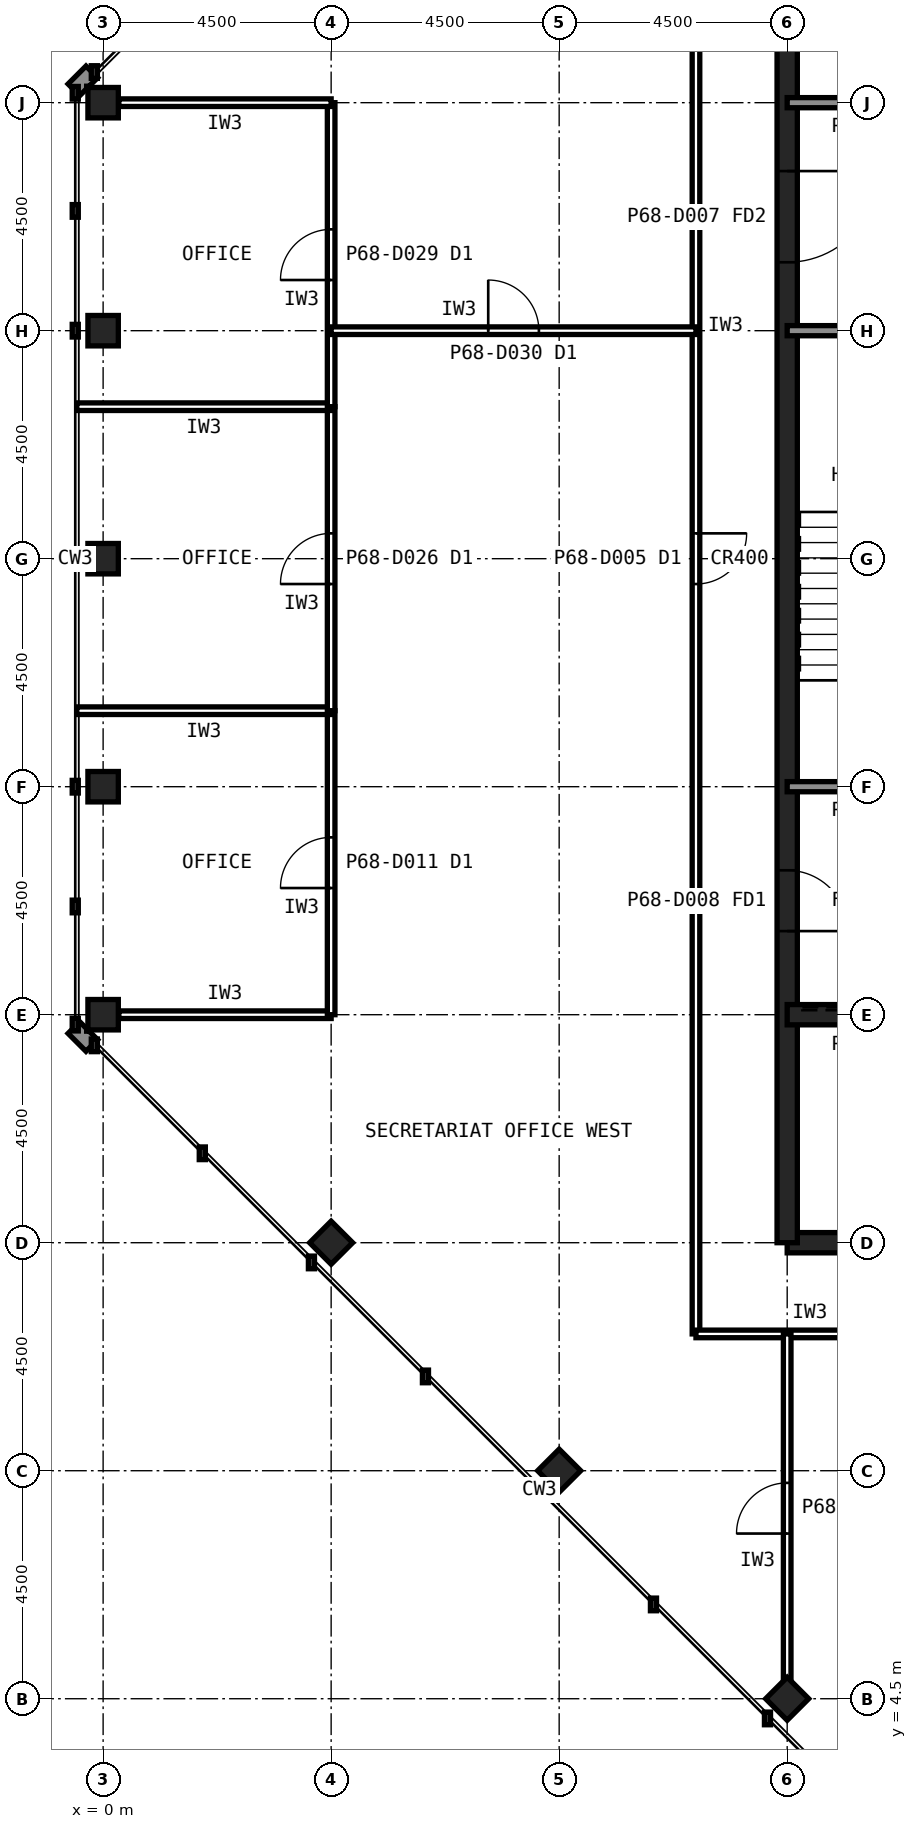
"""IFC4 building model, lengths in metres.
Left out: names, types, materials, properties, quantities, classifications, styles, units other than length and angle.
Written with IfcOpenShell. Run it as: python <this file> out.ifc"""

import sys

from ifc_helpers import new_model, si_unit, direction, frame, frame_2d, origin, origin_2d, place, context, subcontext, project, spatial, rectangle, hollow_rectangle, extrude, element, fill, save


model = new_model("IFC4")
c1 = context("Model", 3, precision=1e-05, world=origin(), true_north=direction((0.0, 1.0)))
c2 = subcontext(c1, "Body", "Model", "MODEL_VIEW")
j1 = project(units=[si_unit("LENGTHUNIT", "METRE"), si_unit("PLANEANGLEUNIT", "RADIAN")], contexts=[c1])
p1 = place(None, origin())
s1 = spatial("IfcSite", under=j1, at=p1, CompositionType="ELEMENT")
p2 = place(p1, origin())
s2 = spatial("IfcBuilding", under=s1, at=p2, CompositionType="ELEMENT")
p3 = place(p2, frame((0.0, 0.0, 286.6)))
s3 = spatial("IfcBuildingStorey", under=s2, at=p3, CompositionType="ELEMENT", Elevation=286.6)
for number, where, z_axis, x_axis in (
    (1, (0.0, 36.0, 0.0), (0.0, 0.0, 1.0), (1.0, 0.0, 0.0)),
    (2, (0.0, 31.5, 0.0), (0.0, 0.0, 1.0), (1.0, 0.0, 0.0)),
    (3, (0.0, 27.0, 0.0), (0.0, 0.0, 1.0), (1.0, 0.0, 0.0)),
    (4, (0.0, 22.5, 0.0), (0.0, 0.0, 1.0), (1.0, 0.0, 0.0)),
    (5, (0.0, 18.0, 0.0), (0.0, 0.0, 1.0), (1.0, 0.0, 0.0)),
    (6, (13.5, 4.5, 0.0), (0.0, 0.0, 1.0), (0.707, 0.707, 0.0)),
    (7, (9.0, 9.0, 0.0), (0.0, 0.0, 1.0), (0.707, 0.707, 0.0)),
    (8, (4.5, 13.5, 0.0), (0.0, 0.0, 1.0), (0.707, 0.707, 0.0)),
):
    element("IfcColumn", number, at=place(p3, frame(where, z_axis=z_axis, x_axis=x_axis)), inside=s3, PredefinedType="COLUMN", context=c2, shape_type="SweptSolid", body=[
        extrude(hollow_rectangle(XDim=0.6, YDim=0.6, WallThickness=0.028, at=origin_2d()), origin(), (0.0, 0.0, 1.0), 4.0),
    ])
p4 = place(p3, frame((13.5, 13.5, 0.0), z_axis=(0.0, 0.0, 1.0), x_axis=(1.0, 0.0, 0.0)))
e9 = element("IfcWall", 9, at=p4, inside=s3, PredefinedType="SHEAR", context=c2, shape_type="SweptSolid", body=[
    extrude(rectangle(XDim=27.0, YDim=0.4, at=frame_2d((13.5, 0.0))), origin(), (0.0, 0.0, 1.0), 4.0),
])
p5 = place(p3, frame((13.5, 40.5, 0.0), z_axis=(0.0, 0.0, 1.0), x_axis=(0.0, -1.0, 0.0)))
e10 = element("IfcWall", 10, at=p5, inside=s3, PredefinedType="SHEAR", context=c2, shape_type="SweptSolid", body=[
    extrude(rectangle(XDim=27.0, YDim=0.4, at=frame_2d((13.5, 0.0))), origin(), (0.0, 0.0, 1.0), 4.0),
])
p6 = place(p5, frame((19.65, 0.0, 0.0)))
e11 = element("IfcOpeningElement", 11, at=p6, cuts=e10, PredefinedType="OPENING", context=c2, shape_type="SweptSolid", body=[
    extrude(rectangle(XDim=1.2, YDim=2.1, at=frame_2d((0.6, 1.05))), frame((0.0, 0.21, 0.0), z_axis=(0.0, -1.0, 0.0), x_axis=(1.0, 0.0, 0.0)), (0.0, 0.0, 1.0), 0.42),
])
p7 = place(p5, frame((5.85, 0.0, 0.0)))
e12 = element("IfcOpeningElement", 12, at=p7, cuts=e10, PredefinedType="OPENING", context=c2, shape_type="SweptSolid", body=[
    extrude(rectangle(XDim=1.8, YDim=2.1, at=frame_2d((0.9, 1.05))), frame((0.0, 0.21, 0.0), z_axis=(0.0, -1.0, 0.0), x_axis=(1.0, 0.0, 0.0)), (0.0, 0.0, 1.0), 0.42),
])
p8 = place(p3, frame((13.5, 18.0, 0.0), z_axis=(0.0, 0.0, 1.0), x_axis=(1.0, 0.0, 0.0)))
e13 = element("IfcWall", 13, at=p8, inside=s3, PredefinedType="SHEAR", context=c2, shape_type="SweptSolid", body=[
    extrude(rectangle(XDim=27.0, YDim=0.4, at=frame_2d((13.5, 0.0))), origin(), (0.0, 0.0, 1.0), 4.0),
])
p9 = place(p8, frame((24.3, 0.0, 0.0)))
e14 = element("IfcOpeningElement", 14, at=p9, cuts=e13, PredefinedType="OPENING", context=c2, shape_type="SweptSolid", body=[
    extrude(rectangle(XDim=0.9, YDim=2.1, at=frame_2d((0.45, 1.05))), frame((0.0, 0.21, 0.0), z_axis=(0.0, -1.0, 0.0), x_axis=(1.0, 0.0, 0.0)), (0.0, 0.0, 1.0), 0.42),
])
p10 = place(p8, frame((5.45, 0.0, 0.0)))
e15 = element("IfcOpeningElement", 15, at=p10, cuts=e13, PredefinedType="OPENING", context=c2, shape_type="SweptSolid", body=[
    extrude(rectangle(XDim=1.1, YDim=2.1, at=frame_2d((0.55, 1.05))), frame((0.0, 0.21, 0.0), z_axis=(0.0, -1.0, 0.0), x_axis=(1.0, 0.0, 0.0)), (0.0, 0.0, 1.0), 0.42),
])
p11 = place(p8, frame((8.45, 0.0, 0.0)))
e16 = element("IfcOpeningElement", 16, at=p11, cuts=e13, PredefinedType="OPENING", context=c2, shape_type="SweptSolid", body=[
    extrude(rectangle(XDim=1.1, YDim=2.1, at=frame_2d((0.55, 1.05))), frame((0.0, 0.21, 0.0), z_axis=(0.0, -1.0, 0.0), x_axis=(1.0, 0.0, 0.0)), (0.0, 0.0, 1.0), 0.42),
])
p12 = place(p8, frame((11.45, 0.0, 0.0)))
e17 = element("IfcOpeningElement", 17, at=p12, cuts=e13, PredefinedType="OPENING", context=c2, shape_type="SweptSolid", body=[
    extrude(rectangle(XDim=1.1, YDim=2.1, at=frame_2d((0.55, 1.05))), frame((0.0, 0.21, 0.0), z_axis=(0.0, -1.0, 0.0), x_axis=(1.0, 0.0, 0.0)), (0.0, 0.0, 1.0), 0.42),
])
p13 = place(p8, frame((14.45, 0.0, 0.0)))
e18 = element("IfcOpeningElement", 18, at=p13, cuts=e13, PredefinedType="OPENING", context=c2, shape_type="SweptSolid", body=[
    extrude(rectangle(XDim=1.1, YDim=2.1, at=frame_2d((0.55, 1.05))), frame((0.0, 0.21, 0.0), z_axis=(0.0, -1.0, 0.0), x_axis=(1.0, 0.0, 0.0)), (0.0, 0.0, 1.0), 0.42),
])
p14 = place(p8, frame((17.45, 0.0, 0.0)))
e19 = element("IfcOpeningElement", 19, at=p14, cuts=e13, PredefinedType="OPENING", context=c2, shape_type="SweptSolid", body=[
    extrude(rectangle(XDim=1.1, YDim=2.1, at=frame_2d((0.55, 1.05))), frame((0.0, 0.21, 0.0), z_axis=(0.0, -1.0, 0.0), x_axis=(1.0, 0.0, 0.0)), (0.0, 0.0, 1.0), 0.42),
])
p15 = place(p8, frame((20.45, 0.0, 0.0)))
e20 = element("IfcOpeningElement", 20, at=p15, cuts=e13, PredefinedType="OPENING", context=c2, shape_type="SweptSolid", body=[
    extrude(rectangle(XDim=1.1, YDim=2.1, at=frame_2d((0.55, 1.05))), frame((0.0, 0.21, 0.0), z_axis=(0.0, -1.0, 0.0), x_axis=(1.0, 0.0, 0.0)), (0.0, 0.0, 1.0), 0.42),
])
p16 = place(p8, frame((1.6, 0.0, 0.0)))
e21 = element("IfcOpeningElement", 21, at=p16, cuts=e13, PredefinedType="OPENING", context=c2, shape_type="SweptSolid", body=[
    extrude(rectangle(XDim=1.3, YDim=2.2, at=frame_2d((0.65, 1.1))), frame((0.0, 0.21, 0.0), z_axis=(0.0, -1.0, 0.0), x_axis=(1.0, 0.0, 0.0)), (0.0, 0.0, 1.0), 0.42),
])
p17 = place(p3, frame((13.5, 36.0, 0.0), z_axis=(0.0, 0.0, 1.0), x_axis=(1.0, 0.0, 0.0)))
e22 = element("IfcWall", 22, at=p17, inside=s3, PredefinedType="SOLIDWALL", context=c2, shape_type="SweptSolid", body=[
    extrude(rectangle(XDim=27.0, YDim=0.2, at=frame_2d((13.5, 0.0))), origin(), (0.0, 0.0, 1.0), 3.84),
])
p18 = place(p17, frame((1.8, 0.0, 0.0)))
e23 = element("IfcOpeningElement", 23, at=p18, cuts=e22, PredefinedType="OPENING", context=c2, shape_type="SweptSolid", body=[
    extrude(rectangle(XDim=0.9, YDim=2.1, at=frame_2d((0.45, 1.05))), frame((0.0, 0.11, 0.0), z_axis=(0.0, -1.0, 0.0), x_axis=(1.0, 0.0, 0.0)), (0.0, 0.0, 1.0), 0.22),
])
p19 = place(p17, frame((5.55, 0.0, 0.0)))
e24 = element("IfcOpeningElement", 24, at=p19, cuts=e22, PredefinedType="OPENING", context=c2, shape_type="SweptSolid", body=[
    extrude(rectangle(XDim=0.9, YDim=2.1, at=frame_2d((0.45, 1.05))), frame((0.0, 0.11, 0.0), z_axis=(0.0, -1.0, 0.0), x_axis=(1.0, 0.0, 0.0)), (0.0, 0.0, 1.0), 0.22),
])
p20 = place(p17, frame((14.55, 0.0, 0.0)))
e25 = element("IfcOpeningElement", 25, at=p20, cuts=e22, PredefinedType="OPENING", context=c2, shape_type="SweptSolid", body=[
    extrude(rectangle(XDim=0.9, YDim=2.1, at=frame_2d((0.45, 1.05))), frame((0.0, 0.11, 0.0), z_axis=(0.0, -1.0, 0.0), x_axis=(1.0, 0.0, 0.0)), (0.0, 0.0, 1.0), 0.22),
])
p21 = place(p17, frame((17.55, 0.0, 0.0)))
e26 = element("IfcOpeningElement", 26, at=p21, cuts=e22, PredefinedType="OPENING", context=c2, shape_type="SweptSolid", body=[
    extrude(rectangle(XDim=0.9, YDim=2.1, at=frame_2d((0.45, 1.05))), frame((0.0, 0.11, 0.0), z_axis=(0.0, -1.0, 0.0), x_axis=(1.0, 0.0, 0.0)), (0.0, 0.0, 1.0), 0.22),
])
p22 = place(p17, frame((24.1, 0.0, 0.0)))
e27 = element("IfcOpeningElement", 27, at=p22, cuts=e22, PredefinedType="OPENING", context=c2, shape_type="SweptSolid", body=[
    extrude(rectangle(XDim=1.3, YDim=2.2, at=frame_2d((0.65, 1.1))), frame((0.0, 0.11, 0.0), z_axis=(0.0, -1.0, 0.0), x_axis=(1.0, 0.0, 0.0)), (0.0, 0.0, 1.0), 0.22),
])
p23 = place(p3, frame((13.5, 22.5, 0.0), z_axis=(0.0, 0.0, 1.0), x_axis=(1.0, 0.0, 0.0)))
e28 = element("IfcWall", 28, at=p23, inside=s3, PredefinedType="SOLIDWALL", context=c2, shape_type="SweptSolid", body=[
    extrude(rectangle(XDim=27.0, YDim=0.2, at=frame_2d((13.5, 0.0))), origin(), (0.0, 0.0, 1.0), 3.84),
])
p24 = place(p23, frame((1.65, 0.0, 0.0)))
e29 = element("IfcOpeningElement", 29, at=p24, cuts=e28, PredefinedType="OPENING", context=c2, shape_type="SweptSolid", body=[
    extrude(rectangle(XDim=1.2, YDim=2.1, at=frame_2d((0.6, 1.05))), frame((0.0, 0.11, 0.0), z_axis=(0.0, -1.0, 0.0), x_axis=(1.0, 0.0, 0.0)), (0.0, 0.0, 1.0), 0.22),
])
p25 = place(p23, frame((6.025, 0.0, 0.0)))
e30 = element("IfcOpeningElement", 30, at=p25, cuts=e28, PredefinedType="OPENING", context=c2, shape_type="SweptSolid", body=[
    extrude(rectangle(XDim=1.0, YDim=2.1, at=frame_2d((0.5, 1.05))), frame((0.0, 0.11, 0.0), z_axis=(0.0, -1.0, 0.0), x_axis=(1.0, 0.0, 0.0)), (0.0, 0.0, 1.0), 0.22),
])
p26 = place(p23, frame((10.525, 0.0, 0.0)))
e31 = element("IfcOpeningElement", 31, at=p26, cuts=e28, PredefinedType="OPENING", context=c2, shape_type="SweptSolid", body=[
    extrude(rectangle(XDim=1.0, YDim=2.1, at=frame_2d((0.5, 1.05))), frame((0.0, 0.11, 0.0), z_axis=(0.0, -1.0, 0.0), x_axis=(1.0, 0.0, 0.0)), (0.0, 0.0, 1.0), 0.22),
])
p27 = place(p23, frame((19.75, 0.0, 0.0)))
e32 = element("IfcOpeningElement", 32, at=p27, cuts=e28, PredefinedType="OPENING", context=c2, shape_type="SweptSolid", body=[
    extrude(rectangle(XDim=1.0, YDim=2.1, at=frame_2d((0.5, 1.05))), frame((0.0, 0.11, 0.0), z_axis=(0.0, -1.0, 0.0), x_axis=(1.0, 0.0, 0.0)), (0.0, 0.0, 1.0), 0.22),
])
p28 = place(p23, frame((15.05, 0.0, 0.0)))
e33 = element("IfcOpeningElement", 33, at=p28, cuts=e28, PredefinedType="OPENING", context=c2, shape_type="SweptSolid", body=[
    extrude(rectangle(XDim=1.4, YDim=2.4, at=frame_2d((0.7, 1.2))), frame((0.0, 0.11, 0.0), z_axis=(0.0, -1.0, 0.0), x_axis=(1.0, 0.0, 0.0)), (0.0, 0.0, 1.0), 0.22),
])
p29 = place(p3, frame((13.5, 31.5, 0.0), z_axis=(0.0, 0.0, 1.0), x_axis=(1.0, 0.0, 0.0)))
e34 = element("IfcWall", 34, at=p29, inside=s3, PredefinedType="SOLIDWALL", context=c2, shape_type="SweptSolid", body=[
    extrude(rectangle(XDim=27.0, YDim=0.2, at=frame_2d((13.5, 0.0))), origin(), (0.0, 0.0, 1.0), 3.84),
])
p30 = place(p29, frame((24.15, 0.0, 0.0)))
e35 = element("IfcOpeningElement", 35, at=p30, cuts=e34, PredefinedType="OPENING", context=c2, shape_type="SweptSolid", body=[
    extrude(rectangle(XDim=1.2, YDim=2.1, at=frame_2d((0.6, 1.05))), frame((0.0, 0.11, 0.0), z_axis=(0.0, -1.0, 0.0), x_axis=(1.0, 0.0, 0.0)), (0.0, 0.0, 1.0), 0.22),
])
p31 = place(p29, frame((15.3, 0.0, 0.0)))
e36 = element("IfcOpeningElement", 36, at=p31, cuts=e34, PredefinedType="OPENING", context=c2, shape_type="SweptSolid", body=[
    extrude(rectangle(XDim=0.9, YDim=2.1, at=frame_2d((0.45, 1.05))), frame((0.0, 0.11, 0.0), z_axis=(0.0, -1.0, 0.0), x_axis=(1.0, 0.0, 0.0)), (0.0, 0.0, 1.0), 0.22),
])
p32 = place(p29, frame((19.8, 0.0, 0.0)))
e37 = element("IfcOpeningElement", 37, at=p32, cuts=e34, PredefinedType="OPENING", context=c2, shape_type="SweptSolid", body=[
    extrude(rectangle(XDim=0.9, YDim=2.1, at=frame_2d((0.45, 1.05))), frame((0.0, 0.11, 0.0), z_axis=(0.0, -1.0, 0.0), x_axis=(1.0, 0.0, 0.0)), (0.0, 0.0, 1.0), 0.22),
])
p33 = place(p3, frame((11.7, 42.3, 0.0), z_axis=(0.0, 0.0, 1.0), x_axis=(0.0, -1.0, 0.0)))
e38 = element("IfcWall", 38, at=p33, inside=s3, PredefinedType="PARTITIONING", context=c2, shape_type="SweptSolid", body=[
    extrude(rectangle(XDim=30.6, YDim=0.15, at=frame_2d((15.3, 0.0))), origin(), (0.0, 0.0, 1.0), 3.84),
])
p34 = place(p33, frame((14.8, 0.0, 0.0)))
e39 = element("IfcOpeningElement", 39, at=p34, cuts=e38, PredefinedType="OPENING", context=c2, shape_type="SweptSolid", body=[
    extrude(rectangle(XDim=1.0, YDim=2.1, at=frame_2d((0.5, 1.05))), frame((0.0, 0.085, 0.0), z_axis=(0.0, -1.0, 0.0), x_axis=(1.0, 0.0, 0.0)), (0.0, 0.0, 1.0), 0.17),
])
p35 = place(p3, frame((11.7, 11.7, 0.0), z_axis=(0.0, 0.0, 1.0), x_axis=(1.0, 0.0, 0.0)))
e40 = element("IfcWall", 40, at=p35, inside=s3, PredefinedType="PARTITIONING", context=c2, shape_type="SweptSolid", body=[
    extrude(rectangle(XDim=4.5, YDim=0.15, at=frame_2d((2.25, 0.0))), origin(), (0.0, 0.0, 1.0), 3.84),
])
p36 = place(p3, frame((0.31, 18.0, 0.0), z_axis=(0.0, 0.0, 1.0), x_axis=(1.0, 0.0, 0.0)))
e41 = element("IfcWall", 41, at=p36, inside=s3, PredefinedType="PARTITIONING", context=c2, shape_type="SweptSolid", body=[
    extrude(rectangle(XDim=4.19, YDim=0.15, at=frame_2d((2.095, 0.0))), origin(), (0.0, 0.0, 1.0), 2.989),
])
p37 = place(p3, frame((4.5, 18.0, 0.0), z_axis=(0.0, 0.0, 1.0), x_axis=(0.0, 1.0, 0.0)))
e42 = element("IfcWall", 42, at=p37, inside=s3, PredefinedType="PARTITIONING", context=c2, shape_type="SweptSolid", body=[
    extrude(rectangle(XDim=6.0, YDim=0.15, at=frame_2d((3.0, 0.0))), origin(), (0.0, 0.0, 1.0), 3.84),
])
p38 = place(p37, frame((2.5, 0.0, 0.0)))
e43 = element("IfcOpeningElement", 43, at=p38, cuts=e42, PredefinedType="OPENING", context=c2, shape_type="SweptSolid", body=[
    extrude(rectangle(XDim=1.0, YDim=2.1, at=frame_2d((0.5, 1.05))), frame((0.0, 0.085, 0.0), z_axis=(0.0, -1.0, 0.0), x_axis=(1.0, 0.0, 0.0)), (0.0, 0.0, 1.0), 0.17),
])
p39 = place(p3, frame((4.5, 24.0, 0.0), z_axis=(0.0, 0.0, 1.0), x_axis=(-1.0, 0.0, 0.0)))
e44 = element("IfcWall", 44, at=p39, inside=s3, PredefinedType="PARTITIONING", context=c2, shape_type="SweptSolid", body=[
    extrude(rectangle(XDim=5.02, YDim=0.15, at=frame_2d((2.51, 0.0))), origin(), (0.0, 0.0, 1.0), 3.84),
])
p40 = place(p3, frame((4.5, 24.0, 0.0), z_axis=(0.0, 0.0, 1.0), x_axis=(0.0, 1.0, 0.0)))
e45 = element("IfcWall", 45, at=p40, inside=s3, PredefinedType="PARTITIONING", context=c2, shape_type="SweptSolid", body=[
    extrude(rectangle(XDim=6.0, YDim=0.15, at=frame_2d((3.0, 0.0))), origin(), (0.0, 0.0, 1.0), 3.84),
])
p41 = place(p40, frame((2.5, 0.0, 0.0)))
e46 = element("IfcOpeningElement", 46, at=p41, cuts=e45, PredefinedType="OPENING", context=c2, shape_type="SweptSolid", body=[
    extrude(rectangle(XDim=1.0, YDim=2.1, at=frame_2d((0.5, 1.05))), frame((0.0, 0.085, 0.0), z_axis=(0.0, -1.0, 0.0), x_axis=(1.0, 0.0, 0.0)), (0.0, 0.0, 1.0), 0.17),
])
p42 = place(p3, frame((4.5, 30.0, 0.0), z_axis=(0.0, 0.0, 1.0), x_axis=(-1.0, 0.0, 0.0)))
e47 = element("IfcWall", 47, at=p42, inside=s3, PredefinedType="PARTITIONING", context=c2, shape_type="SweptSolid", body=[
    extrude(rectangle(XDim=5.02, YDim=0.15, at=frame_2d((2.51, 0.0))), origin(), (0.0, 0.0, 1.0), 3.84),
])
p43 = place(p3, frame((4.5, 30.0, 0.0), z_axis=(0.0, 0.0, 1.0), x_axis=(0.0, 1.0, 0.0)))
e48 = element("IfcWall", 48, at=p43, inside=s3, PredefinedType="PARTITIONING", context=c2, shape_type="SweptSolid", body=[
    extrude(rectangle(XDim=6.0, YDim=0.15, at=frame_2d((3.0, 0.0))), origin(), (0.0, 0.0, 1.0), 3.84),
])
p44 = place(p43, frame((2.5, 0.0, 0.0)))
e49 = element("IfcOpeningElement", 49, at=p44, cuts=e48, PredefinedType="OPENING", context=c2, shape_type="SweptSolid", body=[
    extrude(rectangle(XDim=1.0, YDim=2.1, at=frame_2d((0.5, 1.05))), frame((0.0, 0.085, 0.0), z_axis=(0.0, -1.0, 0.0), x_axis=(1.0, 0.0, 0.0)), (0.0, 0.0, 1.0), 0.17),
])
p45 = place(p3, frame((4.5, 36.0, 0.0), z_axis=(0.0, 0.0, 1.0), x_axis=(-1.0, 0.0, 0.0)))
e50 = element("IfcWall", 50, at=p45, inside=s3, PredefinedType="PARTITIONING", context=c2, shape_type="SweptSolid", body=[
    extrude(rectangle(XDim=4.19, YDim=0.15, at=frame_2d((2.095, 0.0))), origin(), (0.0, 0.0, 1.0), 2.989),
])
p46 = place(p3, frame((13.5, 4.82, 0.0), z_axis=(0.0, 0.0, 1.0), x_axis=(0.0, 1.0, 0.0)))
e51 = element("IfcWall", 51, at=p46, inside=s3, PredefinedType="PARTITIONING", context=c2, shape_type="SweptSolid", body=[
    extrude(rectangle(XDim=6.88, YDim=0.15, at=frame_2d((3.44, 0.0))), origin(), (0.0, 0.0, 1.0), 2.989),
])
p47 = place(p46, frame((2.94, 0.0, 0.0)))
e52 = element("IfcOpeningElement", 52, at=p47, cuts=e51, PredefinedType="OPENING", context=c2, shape_type="SweptSolid", body=[
    extrude(rectangle(XDim=1.0, YDim=2.1, at=frame_2d((0.5, 1.05))), frame((0.0, 0.085, 0.0), z_axis=(0.0, -1.0, 0.0), x_axis=(1.0, 0.0, 0.0)), (0.0, 0.0, 1.0), 0.17),
])
p48 = place(p3, frame((4.5, 31.5, 0.0), z_axis=(0.0, 0.0, 1.0), x_axis=(1.0, 0.0, 0.0)))
e53 = element("IfcWall", 53, at=p48, inside=s3, PredefinedType="PARTITIONING", context=c2, shape_type="SweptSolid", body=[
    extrude(rectangle(XDim=7.2, YDim=0.15, at=frame_2d((3.6, 0.0))), origin(), (0.0, 0.0, 1.0), 2.989),
])
p49 = place(p48, frame((3.1, 0.0, 0.0)))
e54 = element("IfcOpeningElement", 54, at=p49, cuts=e53, PredefinedType="OPENING", context=c2, shape_type="SweptSolid", body=[
    extrude(rectangle(XDim=1.0, YDim=2.1, at=frame_2d((0.5, 1.05))), frame((0.0, 0.085, 0.0), z_axis=(0.0, -1.0, 0.0), x_axis=(1.0, 0.0, 0.0)), (0.0, 0.0, 1.0), 0.17),
])
p50 = place(p6, origin())
e55 = element("IfcDoor", 55, at=p50, inside=s3, OperationType="SINGLE_SWING_RIGHT", PredefinedType="DOOR", context=c2, shape_type="SweptSolid", body=[
    extrude(rectangle(XDim=1.2, YDim=2.1, at=frame_2d((0.6, 1.05))), frame((0.0, 0.025, 0.0), z_axis=(0.0, -1.0, 0.0), x_axis=(1.0, 0.0, 0.0)), (0.0, 0.0, 1.0), 0.05),
])
fill(e11, e55)
p51 = place(p7, origin())
e56 = element("IfcDoor", 56, at=p51, inside=s3, OperationType="SINGLE_SWING_LEFT", PredefinedType="DOOR", context=c2, shape_type="SweptSolid", body=[
    extrude(rectangle(XDim=1.8, YDim=2.1, at=frame_2d((0.9, 1.05))), frame((0.0, 0.025, 0.0), z_axis=(0.0, -1.0, 0.0), x_axis=(1.0, 0.0, 0.0)), (0.0, 0.0, 1.0), 0.05),
])
fill(e12, e56)
p52 = place(p34, origin())
e57 = element("IfcDoor", 57, at=p52, inside=s3, OperationType="SINGLE_SWING_LEFT", PredefinedType="DOOR", context=c2, shape_type="SweptSolid", body=[
    extrude(rectangle(XDim=1.0, YDim=2.1, at=frame_2d((0.5, 1.05))), frame((0.0, 0.025, 0.0), z_axis=(0.0, -1.0, 0.0), x_axis=(1.0, 0.0, 0.0)), (0.0, 0.0, 1.0), 0.05),
])
fill(e39, e57)
p53 = place(p38, origin())
e58 = element("IfcDoor", 58, at=p53, inside=s3, OperationType="SINGLE_SWING_LEFT", PredefinedType="DOOR", context=c2, shape_type="SweptSolid", body=[
    extrude(rectangle(XDim=1.0, YDim=2.1, at=frame_2d((0.5, 1.05))), frame((0.0, 0.025, 0.0), z_axis=(0.0, -1.0, 0.0), x_axis=(1.0, 0.0, 0.0)), (0.0, 0.0, 1.0), 0.05),
])
fill(e43, e58)
p54 = place(p41, origin())
e59 = element("IfcDoor", 59, at=p54, inside=s3, OperationType="SINGLE_SWING_LEFT", PredefinedType="DOOR", context=c2, shape_type="SweptSolid", body=[
    extrude(rectangle(XDim=1.0, YDim=2.1, at=frame_2d((0.5, 1.05))), frame((0.0, 0.025, 0.0), z_axis=(0.0, -1.0, 0.0), x_axis=(1.0, 0.0, 0.0)), (0.0, 0.0, 1.0), 0.05),
])
fill(e46, e59)
p55 = place(p44, origin())
e60 = element("IfcDoor", 60, at=p55, inside=s3, OperationType="SINGLE_SWING_LEFT", PredefinedType="DOOR", context=c2, shape_type="SweptSolid", body=[
    extrude(rectangle(XDim=1.0, YDim=2.1, at=frame_2d((0.5, 1.05))), frame((0.0, 0.025, 0.0), z_axis=(0.0, -1.0, 0.0), x_axis=(1.0, 0.0, 0.0)), (0.0, 0.0, 1.0), 0.05),
])
fill(e49, e60)
p56 = place(p47, origin())
e61 = element("IfcDoor", 61, at=p56, inside=s3, OperationType="SINGLE_SWING_LEFT", PredefinedType="DOOR", context=c2, shape_type="SweptSolid", body=[
    extrude(rectangle(XDim=1.0, YDim=2.1, at=frame_2d((0.5, 1.05))), frame((0.0, 0.025, 0.0), z_axis=(0.0, -1.0, 0.0), x_axis=(1.0, 0.0, 0.0)), (0.0, 0.0, 1.0), 0.05),
])
fill(e52, e61)
p57 = place(p49, origin())
e62 = element("IfcDoor", 62, at=p57, inside=s3, OperationType="SINGLE_SWING_LEFT", PredefinedType="DOOR", context=c2, shape_type="SweptSolid", body=[
    extrude(rectangle(XDim=1.0, YDim=2.1, at=frame_2d((0.5, 1.05))), frame((0.0, 0.025, 0.0), z_axis=(0.0, -1.0, 0.0), x_axis=(1.0, 0.0, 0.0)), (0.0, 0.0, 1.0), 0.05),
])
fill(e54, e62)
save(model, sys.argv[1])
